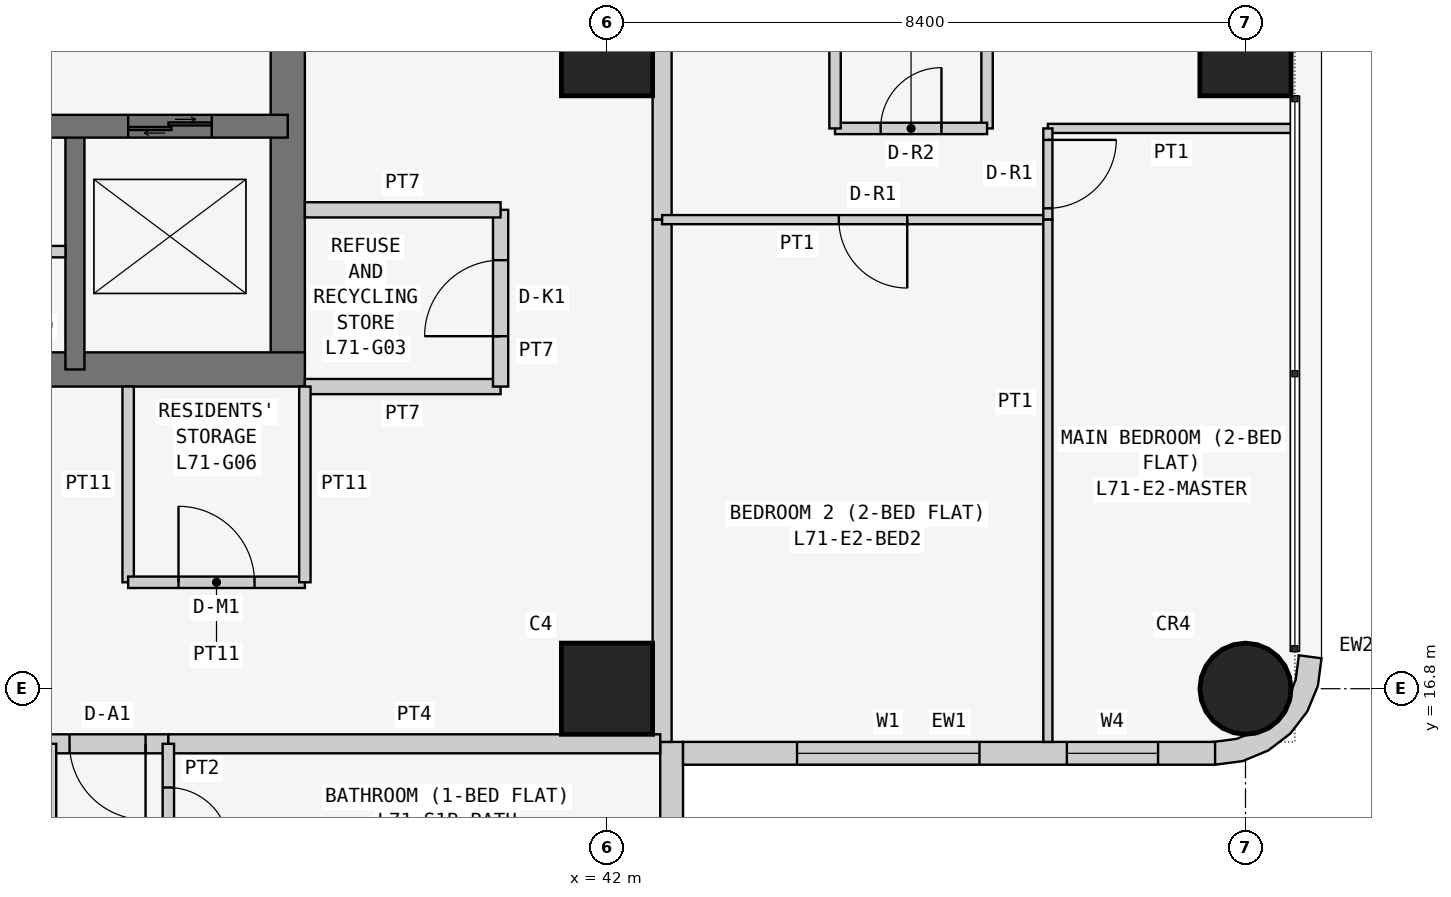
"""IFC4 building model, lengths in metres.
Left out: names, types, materials, properties, quantities, classifications, styles, units other than length and angle.
Written with IfcOpenShell. Run it as: python <this file> out.ifc"""

import sys

from ifc_helpers import new_model, si_unit, direction, frame, frame_2d, origin, origin_2d, place, context, subcontext, project, spatial, polyline, rectangle, circle, outline, extrude, element, fill, save


model = new_model("IFC4")
c1 = context("Model", 3, precision=1e-05, world=origin(), true_north=direction((0.0, 1.0)))
c2 = subcontext(c1, "Body", "Model", "MODEL_VIEW")
j1 = project(units=[si_unit("LENGTHUNIT", "METRE"), si_unit("PLANEANGLEUNIT", "RADIAN")], contexts=[c1])
p1 = place(None, origin())
s1 = spatial("IfcSite", under=j1, at=p1, CompositionType="ELEMENT")
p2 = place(p1, origin())
s2 = spatial("IfcBuilding", under=s1, at=p2, CompositionType="ELEMENT")
p3 = place(p2, frame((0.0, 0.0, 272.1)))
s3 = spatial("IfcBuildingStorey", under=s2, at=p3, CompositionType="ELEMENT", Elevation=272.1)
for number, where, z_axis, x_axis in (
    (1, (42.0, 16.8, 0.0), (0.0, 0.0, 1.0), (1.0, 0.0, 0.0)),
    (2, (42.0, 25.2, 0.0), (0.0, 0.0, 1.0), (1.0, 0.0, 0.0)),
):
    element("IfcColumn", number, at=place(p3, frame(where, z_axis=z_axis, x_axis=x_axis)), inside=s3, PredefinedType="COLUMN", context=c2, shape_type="SweptSolid", body=[
        extrude(rectangle(XDim=1.2, YDim=1.2, at=origin_2d()), origin(), (0.0, 0.0, 1.0), 3.6),
    ])
p4 = place(p3, frame((50.4, 16.8, 0.0), z_axis=(0.0, 0.0, 1.0), x_axis=(1.0, 0.0, 0.0)))
e3 = element("IfcColumn", 3, at=p4, inside=s3, PredefinedType="COLUMN", context=c2, shape_type="SweptSolid", body=[
    extrude(circle(Radius=0.6, at=origin_2d()), origin(), (0.0, 0.0, 1.0), 3.6),
])
p5 = place(p3, frame((50.4, 25.2, 0.0), z_axis=(0.0, 0.0, 1.0), x_axis=(1.0, 0.0, 0.0)))
e4 = element("IfcColumn", 4, at=p5, inside=s3, PredefinedType="COLUMN", context=c2, shape_type="SweptSolid", body=[
    extrude(rectangle(XDim=1.2, YDim=1.2, at=origin_2d()), origin(), (0.0, 0.0, 1.0), 3.6),
])
p6 = place(p3, frame((21.0, 21.0, 0.0), z_axis=(0.0, 0.0, 1.0), x_axis=(1.0, 0.0, 0.0)))
e5 = element("IfcWall", 5, at=p6, inside=s3, PredefinedType="SHEAR", context=c2, shape_type="SweptSolid", body=[
    extrude(rectangle(XDim=17.025, YDim=0.45, at=frame_2d((8.512, 0.0))), origin(), (0.0, 0.0, 1.0), 3.6),
])
p7 = place(p3, frame((37.8, 21.0, 0.0), z_axis=(0.0, 0.0, 1.0), x_axis=(0.0, 1.0, 0.0)))
e6 = element("IfcWall", 6, at=p7, inside=s3, PredefinedType="SHEAR", context=c2, shape_type="SweptSolid", body=[
    extrude(rectangle(XDim=17.025, YDim=0.45, at=frame_2d((8.512, 0.0))), origin(), (0.0, 0.0, 1.0), 3.6),
])
p8 = place(p7, frame((5.2, 0.0, 0.0)))
e7 = element("IfcOpeningElement", 7, at=p8, cuts=e6, PredefinedType="OPENING", context=c2, shape_type="SweptSolid", body=[
    extrude(rectangle(XDim=1.2, YDim=2.1, at=frame_2d((0.6, 1.05))), frame((0.0, 0.235, 0.0), z_axis=(0.0, -1.0, 0.0), x_axis=(1.0, 0.0, 0.0)), (0.0, 0.0, 1.0), 0.47),
])
p9 = place(p3, frame((26.6, 24.2, 0.0), z_axis=(0.0, 0.0, 1.0), x_axis=(1.0, 0.0, 0.0)))
e8 = element("IfcWall", 8, at=p9, inside=s3, PredefinedType="SHEAR", context=c2, shape_type="SweptSolid", body=[
    extrude(rectangle(XDim=11.2, YDim=0.3, at=frame_2d((5.6, 0.0))), origin(), (0.0, 0.0, 1.0), 3.6),
])
p10 = place(p9, frame((0.913, 0.0, 0.0)))
e9 = element("IfcOpeningElement", 9, at=p10, cuts=e8, PredefinedType="OPENING", context=c2, shape_type="SweptSolid", body=[
    extrude(rectangle(XDim=1.0, YDim=2.1, at=frame_2d((0.5, 1.05))), frame((0.0, 0.16, 0.0), z_axis=(0.0, -1.0, 0.0), x_axis=(1.0, 0.0, 0.0)), (0.0, 0.0, 1.0), 0.32),
])
p11 = place(p9, frame((3.7, 0.0, 0.0)))
e10 = element("IfcOpeningElement", 10, at=p11, cuts=e8, PredefinedType="OPENING", context=c2, shape_type="SweptSolid", body=[
    extrude(rectangle(XDim=1.0, YDim=2.1, at=frame_2d((0.5, 1.05))), frame((0.0, 0.16, 0.0), z_axis=(0.0, -1.0, 0.0), x_axis=(1.0, 0.0, 0.0)), (0.0, 0.0, 1.0), 0.32),
])
p12 = place(p9, frame((6.5, 0.0, 0.0)))
e11 = element("IfcOpeningElement", 11, at=p12, cuts=e8, PredefinedType="OPENING", context=c2, shape_type="SweptSolid", body=[
    extrude(rectangle(XDim=1.0, YDim=2.1, at=frame_2d((0.5, 1.05))), frame((0.0, 0.16, 0.0), z_axis=(0.0, -1.0, 0.0), x_axis=(1.0, 0.0, 0.0)), (0.0, 0.0, 1.0), 0.32),
])
p13 = place(p9, frame((9.1, 0.0, 0.0)))
e12 = element("IfcOpeningElement", 12, at=p13, cuts=e8, PredefinedType="OPENING", context=c2, shape_type="SweptSolid", body=[
    extrude(rectangle(XDim=1.1, YDim=2.1, at=frame_2d((0.55, 1.05))), frame((0.0, 0.16, 0.0), z_axis=(0.0, -1.0, 0.0), x_axis=(1.0, 0.0, 0.0)), (0.0, 0.0, 1.0), 0.32),
])
p14 = place(p3, frame((35.0, 21.0, 0.0), z_axis=(0.0, 0.0, 1.0), x_axis=(0.0, 1.0, 0.0)))
e13 = element("IfcWall", 13, at=p14, inside=s3, PredefinedType="SHEAR", context=c2, shape_type="SweptSolid", body=[
    extrude(rectangle(XDim=3.2, YDim=0.25, at=frame_2d((1.6, 0.0))), origin(), (0.0, 0.0, 1.0), 3.6),
])
p15 = place(p3, frame((42.85, 8.8, 0.0), z_axis=(0.0, 0.0, 1.0), x_axis=(0.0, 1.0, 0.0)))
e14 = element("IfcWall", 14, at=p15, inside=s3, PredefinedType="SOLIDWALL", context=c2, shape_type="SweptSolid", body=[
    extrude(rectangle(XDim=7.3, YDim=0.3, at=frame_2d((3.65, 0.0))), origin(), (0.0, 0.0, 1.0), 3.45),
])
p16 = place(p15, frame((3.1, 0.0, 0.9)))
e15 = element("IfcOpeningElement", 15, at=p16, cuts=e14, PredefinedType="OPENING", context=c2, shape_type="SweptSolid", body=[
    extrude(rectangle(XDim=2.4, YDim=1.5, at=frame_2d((1.2, 0.75))), frame((0.0, 0.16, 0.0), z_axis=(0.0, -1.0, 0.0), x_axis=(1.0, 0.0, 0.0)), (0.0, 0.0, 1.0), 0.32),
])
p17 = place(p15, frame((0.75, 0.0, 0.9)))
e16 = element("IfcOpeningElement", 16, at=p17, cuts=e14, PredefinedType="OPENING", context=c2, shape_type="SweptSolid", body=[
    extrude(rectangle(XDim=1.2, YDim=1.5, at=frame_2d((0.6, 0.75))), frame((0.0, 0.16, 0.0), z_axis=(0.0, -1.0, 0.0), x_axis=(1.0, 0.0, 0.0)), (0.0, 0.0, 1.0), 0.32),
])
p18 = place(p3, frame((43.0, 15.95, 0.0), z_axis=(0.0, 0.0, 1.0), x_axis=(1.0, 0.0, 0.0)))
e17 = element("IfcWall", 17, at=p18, inside=s3, PredefinedType="SOLIDWALL", context=c2, shape_type="SweptSolid", body=[
    extrude(rectangle(XDim=7.0, YDim=0.3, at=frame_2d((3.5, 0.0))), origin(), (0.0, 0.0, 1.0), 3.45),
])
p19 = place(p18, frame((1.5, 0.0, 0.9)))
e18 = element("IfcOpeningElement", 18, at=p19, cuts=e17, PredefinedType="OPENING", context=c2, shape_type="SweptSolid", body=[
    extrude(rectangle(XDim=2.4, YDim=1.5, at=frame_2d((1.2, 0.75))), frame((0.0, 0.16, 0.0), z_axis=(0.0, -1.0, 0.0), x_axis=(1.0, 0.0, 0.0)), (0.0, 0.0, 1.0), 0.32),
])
p20 = place(p18, frame((5.05, 0.0, 0.9)))
e19 = element("IfcOpeningElement", 19, at=p20, cuts=e17, PredefinedType="OPENING", context=c2, shape_type="SweptSolid", body=[
    extrude(rectangle(XDim=1.2, YDim=1.5, at=frame_2d((0.6, 0.75))), frame((0.0, 0.16, 0.0), z_axis=(0.0, -1.0, 0.0), x_axis=(1.0, 0.0, 0.0)), (0.0, 0.0, 1.0), 0.32),
])
p21 = place(p3, frame((50.038, 16.224, 0.0), z_axis=(0.0, 0.0, 1.0), x_axis=(0.707106781187, -0.707106781187, 0.0)))
e20 = element("IfcWall", 20, at=p21, inside=s3, PredefinedType="SOLIDWALL", context=c2, shape_type="SweptSolid", body=[
    extrude(outline(polyline([(0.047, 1.455), (0.233, 1.212), (0.292, 1.069), (0.358, 1.003), (0.449, 0.782), (0.449, 0.543), (0.358, 0.322), (0.292, 0.257), (0.233, 0.114), (0.047, -0.129), (0.033, -0.143), (0.273, -0.327), (0.495, -0.037), (0.635, 0.301), (0.683, 0.663), (0.635, 1.025), (0.495, 1.363), (0.273, 1.653), (0.033, 1.469), (0.047, 1.455)])), origin(), (0.0, 0.0, 1.0), 3.45),
])
p22 = place(p3, frame((38.025, 20.775, 0.0), z_axis=(0.0, 0.0, 1.0), x_axis=(1.0, 0.0, 0.0)))
e21 = element("IfcWall", 21, at=p22, inside=s3, PredefinedType="PARTITIONING", context=c2, shape_type="SweptSolid", body=[
    extrude(rectangle(XDim=2.575, YDim=0.2, at=frame_2d((1.288, 0.0))), origin(), (0.0, 0.0, 1.0), 3.45),
])
p23 = place(p3, frame((40.6, 20.775, 0.0), z_axis=(0.0, 0.0, 1.0), x_axis=(0.0, 1.0, 0.0)))
e22 = element("IfcWall", 22, at=p23, inside=s3, PredefinedType="PARTITIONING", context=c2, shape_type="SweptSolid", body=[
    extrude(rectangle(XDim=2.325, YDim=0.2, at=frame_2d((1.163, 0.0))), origin(), (0.0, 0.0, 1.0), 3.45),
])
p24 = place(p23, frame((0.663, 0.0, 0.0)))
e23 = element("IfcOpeningElement", 23, at=p24, cuts=e22, PredefinedType="OPENING", context=c2, shape_type="SweptSolid", body=[
    extrude(rectangle(XDim=1.0, YDim=2.1, at=frame_2d((0.5, 1.05))), frame((0.0, 0.11, 0.0), z_axis=(0.0, -1.0, 0.0), x_axis=(1.0, 0.0, 0.0)), (0.0, 0.0, 1.0), 0.22),
])
p25 = place(p3, frame((40.6, 23.1, 0.0), z_axis=(0.0, 0.0, 1.0), x_axis=(-1.0, 0.0, 0.0)))
e24 = element("IfcWall", 24, at=p25, inside=s3, PredefinedType="PARTITIONING", context=c2, shape_type="SweptSolid", body=[
    extrude(rectangle(XDim=2.575, YDim=0.2, at=frame_2d((1.288, 0.0))), origin(), (0.0, 0.0, 1.0), 3.45),
])
p26 = place(p3, frame((35.7, 20.775, 0.0), z_axis=(0.0, 0.0, 1.0), x_axis=(0.0, -1.0, 0.0)))
e25 = element("IfcWall", 25, at=p26, inside=s3, PredefinedType="PARTITIONING", context=c2, shape_type="SweptSolid", body=[
    extrude(rectangle(XDim=2.575, YDim=0.15, at=frame_2d((1.288, 0.0))), origin(), (0.0, 0.0, 1.0), 3.45),
])
p27 = place(p3, frame((35.7, 18.2, 0.0), z_axis=(0.0, 0.0, 1.0), x_axis=(1.0, 0.0, 0.0)))
e26 = element("IfcWall", 26, at=p27, inside=s3, PredefinedType="PARTITIONING", context=c2, shape_type="SweptSolid", body=[
    extrude(rectangle(XDim=2.325, YDim=0.15, at=frame_2d((1.163, 0.0))), origin(), (0.0, 0.0, 1.0), 3.45),
])
p28 = place(p27, frame((0.663, 0.0, 0.0)))
e27 = element("IfcOpeningElement", 27, at=p28, cuts=e26, PredefinedType="OPENING", context=c2, shape_type="SweptSolid", body=[
    extrude(rectangle(XDim=1.0, YDim=2.1, at=frame_2d((0.5, 1.05))), frame((0.0, 0.085, 0.0), z_axis=(0.0, -1.0, 0.0), x_axis=(1.0, 0.0, 0.0)), (0.0, 0.0, 1.0), 0.17),
])
p29 = place(p3, frame((38.025, 18.2, 0.0), z_axis=(0.0, 0.0, 1.0), x_axis=(0.0, 1.0, 0.0)))
e28 = element("IfcWall", 28, at=p29, inside=s3, PredefinedType="PARTITIONING", context=c2, shape_type="SweptSolid", body=[
    extrude(rectangle(XDim=2.575, YDim=0.15, at=frame_2d((1.288, 0.0))), origin(), (0.0, 0.0, 1.0), 3.45),
])
p30 = place(p3, frame((42.725, 29.4, 0.0), z_axis=(0.0, 0.0, 1.0), x_axis=(0.0, -1.0, 0.0)))
e29 = element("IfcWall", 29, at=p30, inside=s3, PredefinedType="PARTITIONING", context=c2, shape_type="SweptSolid", body=[
    extrude(rectangle(XDim=6.429, YDim=0.25, at=frame_2d((3.214, 0.0))), origin(), (0.0, 0.0, 1.0), 3.45),
])
p31 = place(p30, frame((0.5, 0.0, 0.0)))
e30 = element("IfcOpeningElement", 30, at=p31, cuts=e29, PredefinedType="OPENING", context=c2, shape_type="SweptSolid", body=[
    extrude(rectangle(XDim=1.0, YDim=2.1, at=frame_2d((0.5, 1.05))), frame((0.0, 0.135, 0.0), z_axis=(0.0, -1.0, 0.0), x_axis=(1.0, 0.0, 0.0)), (0.0, 0.0, 1.0), 0.27),
])
p32 = place(p3, frame((42.725, 22.971, 0.0), z_axis=(0.0, 0.0, 1.0), x_axis=(0.0, -1.0, 0.0)))
e31 = element("IfcWall", 31, at=p32, inside=s3, PredefinedType="PARTITIONING", context=c2, shape_type="SweptSolid", body=[
    extrude(rectangle(XDim=6.871, YDim=0.25, at=frame_2d((3.436, 0.0))), origin(), (0.0, 0.0, 1.0), 3.45),
])
p33 = place(p3, frame((36.229, 16.075, 0.0), z_axis=(0.0, 0.0, 1.0), x_axis=(-1.0, 0.0, 0.0)))
e32 = element("IfcWall", 32, at=p33, inside=s3, PredefinedType="PARTITIONING", context=c2, shape_type="SweptSolid", body=[
    extrude(rectangle(XDim=1.6, YDim=0.25, at=frame_2d((0.8, 0.0))), origin(), (0.0, 0.0, 1.0), 3.45),
])
p34 = place(p33, frame((0.3, 0.0, 0.0)))
e33 = element("IfcOpeningElement", 33, at=p34, cuts=e32, PredefinedType="OPENING", context=c2, shape_type="SweptSolid", body=[
    extrude(rectangle(XDim=1.0, YDim=2.1, at=frame_2d((0.5, 1.05))), frame((0.0, 0.135, 0.0), z_axis=(0.0, -1.0, 0.0), x_axis=(1.0, 0.0, 0.0)), (0.0, 0.0, 1.0), 0.27),
])
p35 = place(p3, frame((42.7, 16.075, 0.0), z_axis=(0.0, 0.0, 1.0), x_axis=(-1.0, 0.0, 0.0)))
e34 = element("IfcWall", 34, at=p35, inside=s3, PredefinedType="PARTITIONING", context=c2, shape_type="SweptSolid", body=[
    extrude(rectangle(XDim=6.471, YDim=0.25, at=frame_2d((3.235, 0.0))), origin(), (0.0, 0.0, 1.0), 3.45),
])
p36 = place(p3, frame((47.0, 29.4, 0.0), z_axis=(0.0, 0.0, 1.0), x_axis=(0.0, -1.0, 0.0)))
e35 = element("IfcWall", 35, at=p36, inside=s3, PredefinedType="PARTITIONING", context=c2, shape_type="SweptSolid", body=[
    extrude(rectangle(XDim=5.229, YDim=0.15, at=frame_2d((2.615, 0.0))), origin(), (0.0, 0.0, 1.0), 3.45),
])
p37 = place(p3, frame((47.0, 24.171, 0.0), z_axis=(0.0, 0.0, 1.0), x_axis=(-1.0, 0.0, 0.0)))
e36 = element("IfcWall", 36, at=p37, inside=s3, PredefinedType="PARTITIONING", context=c2, shape_type="SweptSolid", body=[
    extrude(rectangle(XDim=2.0, YDim=0.15, at=frame_2d((1.0, 0.0))), origin(), (0.0, 0.0, 1.0), 3.45),
])
p38 = place(p37, frame((0.6, 0.0, 0.0)))
e37 = element("IfcOpeningElement", 37, at=p38, cuts=e36, PredefinedType="OPENING", context=c2, shape_type="SweptSolid", body=[
    extrude(rectangle(XDim=0.8, YDim=2.1, at=frame_2d((0.4, 1.05))), frame((0.0, 0.085, 0.0), z_axis=(0.0, -1.0, 0.0), x_axis=(1.0, 0.0, 0.0)), (0.0, 0.0, 1.0), 0.17),
])
p39 = place(p3, frame((45.0, 24.171, 0.0), z_axis=(0.0, 0.0, 1.0), x_axis=(0.0, 1.0, 0.0)))
e38 = element("IfcWall", 38, at=p39, inside=s3, PredefinedType="PARTITIONING", context=c2, shape_type="SweptSolid", body=[
    extrude(rectangle(XDim=5.229, YDim=0.15, at=frame_2d((2.615, 0.0))), origin(), (0.0, 0.0, 1.0), 3.45),
])
p40 = place(p3, frame((47.8, 22.971, 0.0), z_axis=(0.0, 0.0, 1.0), x_axis=(-1.0, 0.0, 0.0)))
e39 = element("IfcWall", 39, at=p40, inside=s3, PredefinedType="PARTITIONING", context=c2, shape_type="SweptSolid", body=[
    extrude(rectangle(XDim=5.075, YDim=0.12, at=frame_2d((2.538, 0.0))), origin(), (0.0, 0.0, 1.0), 3.45),
])
p41 = place(p40, frame((1.85, 0.0, 0.0)))
e40 = element("IfcOpeningElement", 40, at=p41, cuts=e39, PredefinedType="OPENING", context=c2, shape_type="SweptSolid", body=[
    extrude(rectangle(XDim=0.9, YDim=2.1, at=frame_2d((0.45, 1.05))), frame((0.0, 0.07, 0.0), z_axis=(0.0, -1.0, 0.0), x_axis=(1.0, 0.0, 0.0)), (0.0, 0.0, 1.0), 0.14),
])
p42 = place(p3, frame((51.05, 24.171, 0.0), z_axis=(0.0, 0.0, 1.0), x_axis=(-1.0, 0.0, 0.0)))
e41 = element("IfcWall", 41, at=p42, inside=s3, PredefinedType="PARTITIONING", context=c2, shape_type="SweptSolid", body=[
    extrude(rectangle(XDim=3.25, YDim=0.12, at=frame_2d((1.625, 0.0))), origin(), (0.0, 0.0, 1.0), 3.45),
])
p43 = place(p3, frame((47.8, 24.171, 0.0), z_axis=(0.0, 0.0, 1.0), x_axis=(0.0, -1.0, 0.0)))
e42 = element("IfcWall", 42, at=p43, inside=s3, PredefinedType="PARTITIONING", context=c2, shape_type="SweptSolid", body=[
    extrude(rectangle(XDim=1.2, YDim=0.12, at=frame_2d((0.6, 0.0))), origin(), (0.0, 0.0, 1.0), 3.45),
])
p44 = place(p43, frame((0.151, 0.0, 0.0)))
e43 = element("IfcOpeningElement", 43, at=p44, cuts=e42, PredefinedType="OPENING", context=c2, shape_type="SweptSolid", body=[
    extrude(rectangle(XDim=0.9, YDim=2.1, at=frame_2d((0.45, 1.05))), frame((0.0, 0.07, 0.0), z_axis=(0.0, -1.0, 0.0), x_axis=(1.0, 0.0, 0.0)), (0.0, 0.0, 1.0), 0.14),
])
p45 = place(p3, frame((47.8, 22.971, 0.0), z_axis=(0.0, 0.0, 1.0), x_axis=(0.0, -1.0, 0.0)))
e44 = element("IfcWall", 44, at=p45, inside=s3, PredefinedType="PARTITIONING", context=c2, shape_type="SweptSolid", body=[
    extrude(rectangle(XDim=6.871, YDim=0.12, at=frame_2d((3.436, 0.0))), origin(), (0.0, 0.0, 1.0), 3.45),
])
p46 = place(p3, frame((34.629, 13.4, 0.0), z_axis=(0.0, 0.0, 1.0), x_axis=(0.0, 1.0, 0.0)))
e45 = element("IfcWall", 45, at=p46, inside=s3, PredefinedType="PARTITIONING", context=c2, shape_type="SweptSolid", body=[
    extrude(rectangle(XDim=2.675, YDim=0.25, at=frame_2d((1.337, 0.0))), origin(), (0.0, 0.0, 1.0), 3.45),
])
p47 = place(p3, frame((36.229, 16.075, 0.0), z_axis=(0.0, 0.0, 1.0), x_axis=(0.0, -1.0, 0.0)))
e46 = element("IfcWall", 46, at=p47, inside=s3, PredefinedType="PARTITIONING", context=c2, shape_type="SweptSolid", body=[
    extrude(rectangle(XDim=1.675, YDim=0.15, at=frame_2d((0.837, 0.0))), origin(), (0.0, 0.0, 1.0), 3.45),
])
p48 = place(p47, frame((0.575, 0.0, 0.0)))
e47 = element("IfcOpeningElement", 47, at=p48, cuts=e46, PredefinedType="OPENING", context=c2, shape_type="SweptSolid", body=[
    extrude(rectangle(XDim=0.8, YDim=2.1, at=frame_2d((0.4, 1.05))), frame((0.0, 0.085, 0.0), z_axis=(0.0, -1.0, 0.0), x_axis=(1.0, 0.0, 0.0)), (0.0, 0.0, 1.0), 0.17),
])
p49 = place(p3, frame((32.325, 22.55, 0.0), z_axis=(0.0, 0.0, 1.0), x_axis=(1.0, 0.0, 0.0)))
e48 = element("IfcWall", 48, at=p49, inside=s3, PredefinedType="PARTITIONING", context=c2, shape_type="SweptSolid", body=[
    extrude(rectangle(XDim=2.55, YDim=0.15, at=frame_2d((1.275, 0.0))), origin(), (0.0, 0.0, 1.0), 3.45),
])
p50 = place(p49, frame((0.875, 0.0, 0.0)))
e49 = element("IfcOpeningElement", 49, at=p50, cuts=e48, PredefinedType="OPENING", context=c2, shape_type="SweptSolid", body=[
    extrude(rectangle(XDim=0.8, YDim=2.1, at=frame_2d((0.4, 1.05))), frame((0.0, 0.085, 0.0), z_axis=(0.0, -1.0, 0.0), x_axis=(1.0, 0.0, 0.0)), (0.0, 0.0, 1.0), 0.17),
])
p51 = place(p19, origin())
e50 = element("IfcWindow", 50, at=p51, inside=s3, PartitioningType="SINGLE_PANEL", PredefinedType="WINDOW", context=c2, shape_type="SweptSolid", body=[
    extrude(rectangle(XDim=2.4, YDim=1.5, at=frame_2d((1.2, 0.75))), frame((0.0, 0.03, 0.0), z_axis=(0.0, -1.0, 0.0), x_axis=(1.0, 0.0, 0.0)), (0.0, 0.0, 1.0), 0.06),
])
fill(e18, e50)
p52 = place(p20, origin())
e51 = element("IfcWindow", 51, at=p52, inside=s3, PartitioningType="SINGLE_PANEL", PredefinedType="WINDOW", context=c2, shape_type="SweptSolid", body=[
    extrude(rectangle(XDim=1.2, YDim=1.5, at=frame_2d((0.6, 0.75))), frame((0.0, 0.03, 0.0), z_axis=(0.0, -1.0, 0.0), x_axis=(1.0, 0.0, 0.0)), (0.0, 0.0, 1.0), 0.06),
])
fill(e19, e51)
p53 = place(p24, origin())
e52 = element("IfcDoor", 52, at=p53, inside=s3, OperationType="SINGLE_SWING_LEFT", PredefinedType="DOOR", context=c2, shape_type="SweptSolid", body=[
    extrude(rectangle(XDim=1.0, YDim=2.1, at=frame_2d((0.5, 1.05))), frame((0.0, 0.025, 0.0), z_axis=(0.0, -1.0, 0.0), x_axis=(1.0, 0.0, 0.0)), (0.0, 0.0, 1.0), 0.05),
])
fill(e23, e52)
p54 = place(p28, origin())
e53 = element("IfcDoor", 53, at=p54, inside=s3, OperationType="SINGLE_SWING_LEFT", PredefinedType="DOOR", context=c2, shape_type="SweptSolid", body=[
    extrude(rectangle(XDim=1.0, YDim=2.1, at=frame_2d((0.5, 1.05))), frame((0.0, 0.025, 0.0), z_axis=(0.0, -1.0, 0.0), x_axis=(1.0, 0.0, 0.0)), (0.0, 0.0, 1.0), 0.05),
])
fill(e27, e53)
p55 = place(p38, frame((0.8, 0.0, 0.0), z_axis=(0.0, 0.0, 1.0), x_axis=(-1.0, 0.0, 0.0)))
e54 = element("IfcDoor", 54, at=p55, inside=s3, OperationType="SINGLE_SWING_RIGHT", PredefinedType="DOOR", context=c2, shape_type="SweptSolid", body=[
    extrude(rectangle(XDim=0.8, YDim=2.1, at=frame_2d((0.4, 1.05))), frame((0.0, 0.025, 0.0), z_axis=(0.0, -1.0, 0.0), x_axis=(1.0, 0.0, 0.0)), (0.0, 0.0, 1.0), 0.05),
])
fill(e37, e54)
p56 = place(p41, origin())
e55 = element("IfcDoor", 55, at=p56, inside=s3, OperationType="SINGLE_SWING_LEFT", PredefinedType="DOOR", context=c2, shape_type="SweptSolid", body=[
    extrude(rectangle(XDim=0.9, YDim=2.1, at=frame_2d((0.45, 1.05))), frame((0.0, 0.025, 0.0), z_axis=(0.0, -1.0, 0.0), x_axis=(1.0, 0.0, 0.0)), (0.0, 0.0, 1.0), 0.05),
])
fill(e40, e55)
p57 = place(p44, origin())
e56 = element("IfcDoor", 56, at=p57, inside=s3, OperationType="SINGLE_SWING_LEFT", PredefinedType="DOOR", context=c2, shape_type="SweptSolid", body=[
    extrude(rectangle(XDim=0.9, YDim=2.1, at=frame_2d((0.45, 1.05))), frame((0.0, 0.025, 0.0), z_axis=(0.0, -1.0, 0.0), x_axis=(1.0, 0.0, 0.0)), (0.0, 0.0, 1.0), 0.05),
])
fill(e43, e56)
p58 = place(p34, origin())
e57 = element("IfcDoor", 57, at=p58, inside=s3, OperationType="SINGLE_SWING_LEFT", PredefinedType="DOOR", context=c2, shape_type="SweptSolid", body=[
    extrude(rectangle(XDim=1.0, YDim=2.1, at=frame_2d((0.5, 1.05))), frame((0.0, 0.025, 0.0), z_axis=(0.0, -1.0, 0.0), x_axis=(1.0, 0.0, 0.0)), (0.0, 0.0, 1.0), 0.05),
])
fill(e33, e57)
p59 = place(p48, origin())
e58 = element("IfcDoor", 58, at=p59, inside=s3, OperationType="SINGLE_SWING_RIGHT", PredefinedType="DOOR", context=c2, shape_type="SweptSolid", body=[
    extrude(rectangle(XDim=0.8, YDim=2.1, at=frame_2d((0.4, 1.05))), frame((0.0, 0.025, 0.0), z_axis=(0.0, -1.0, 0.0), x_axis=(1.0, 0.0, 0.0)), (0.0, 0.0, 1.0), 0.05),
])
fill(e47, e58)
p60 = place(p13, origin())
e59 = element("IfcDoor", 59, at=p60, inside=s3, OperationType="DOUBLE_DOOR_SLIDING", PredefinedType="DOOR", context=c2, shape_type="SweptSolid", body=[
    extrude(rectangle(XDim=1.1, YDim=2.1, at=frame_2d((0.55, 1.05))), frame((0.0, 0.025, 0.0), z_axis=(0.0, -1.0, 0.0), x_axis=(1.0, 0.0, 0.0)), (0.0, 0.0, 1.0), 0.05),
])
fill(e12, e59)
save(model, sys.argv[1])
